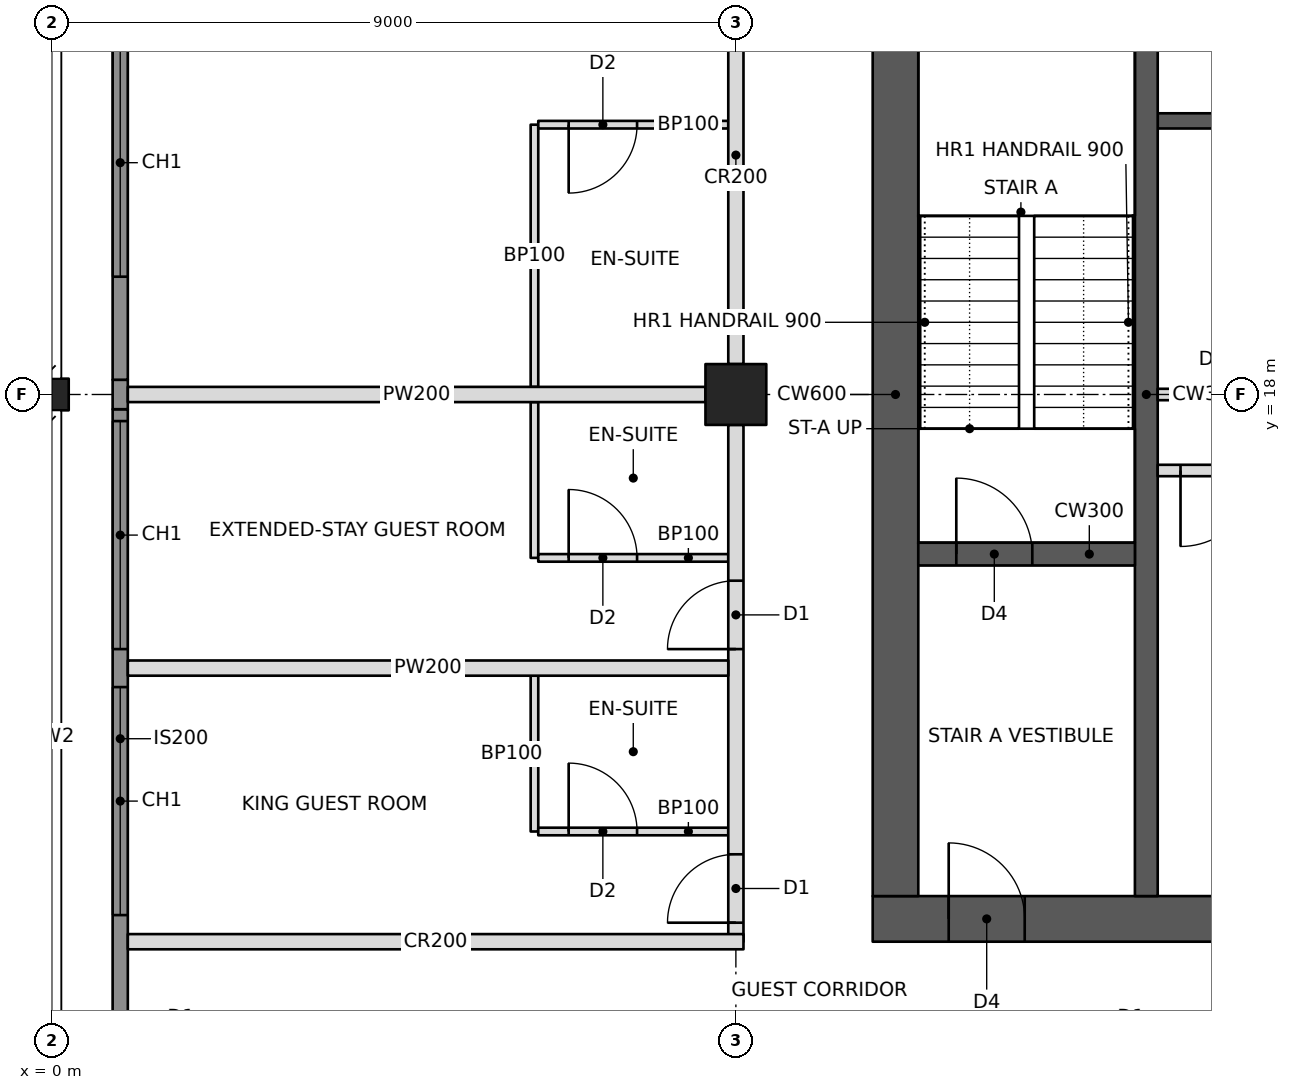
"""IFC4 building model, lengths in metres.
Left out: names, types, materials, properties, quantities, classifications, styles, units other than length and angle.
Written with IfcOpenShell. Run it as: python <this file> out.ifc"""

import sys

from ifc_helpers import new_model, si_unit, direction, frame, frame_2d, origin, origin_2d, place, context, subcontext, project, spatial, rectangle, hollow_rectangle, i_section, extrude, element, fill, save


model = new_model("IFC4")
c1 = context("Model", 3, precision=1e-05, world=origin(), true_north=direction((0.0, 1.0)))
c2 = subcontext(c1, "Body", "Model", "MODEL_VIEW")
j1 = project(units=[si_unit("LENGTHUNIT", "METRE"), si_unit("PLANEANGLEUNIT", "RADIAN")], contexts=[c1])
p1 = place(None, origin())
s1 = spatial("IfcSite", under=j1, at=p1, CompositionType="ELEMENT")
p2 = place(p1, origin())
s2 = spatial("IfcBuilding", under=s1, at=p2, CompositionType="ELEMENT")
p3 = place(p2, frame((0.0, 0.0, 255.4)))
s3 = spatial("IfcBuildingStorey", under=s2, at=p3, CompositionType="ELEMENT", Elevation=255.4)
p4 = place(p3, frame((0.0, 18.0, 0.0), z_axis=(0.0, 0.0, 1.0), x_axis=(0.0, 1.0, 0.0)))
e1 = element("IfcColumn", 1, at=p4, inside=s3, PredefinedType="COLUMN", context=c2, shape_type="SweptSolid", body=[
    extrude(i_section(OverallWidth=0.417, OverallDepth=0.445, WebThickness=0.039, FlangeThickness=0.063, at=origin_2d()), origin(), (0.0, 0.0, 1.0), 3.6),
])
p5 = place(p3, frame((9.0, 18.0, 0.0), z_axis=(0.0, 0.0, 1.0), x_axis=(1.0, 0.0, 0.0)))
e2 = element("IfcColumn", 2, at=p5, inside=s3, PredefinedType="COLUMN", context=c2, shape_type="SweptSolid", body=[
    extrude(hollow_rectangle(XDim=0.8, YDim=0.8, WallThickness=0.032, at=origin_2d()), origin(), (0.0, 0.0, 1.0), 3.6),
])
p6 = place(p3, frame((10.8, 11.1, 0.0), z_axis=(0.0, 0.0, 1.0), x_axis=(1.0, 0.0, 0.0)))
e3 = element("IfcWall", 3, at=p6, inside=s3, PredefinedType="SHEAR", context=c2, shape_type="SweptSolid", body=[
    extrude(rectangle(XDim=23.4, YDim=0.6, at=frame_2d((11.7, 0.0))), origin(), (0.0, 0.0, 1.0), 3.6),
])
p7 = place(p6, frame((1.0, 0.0, 0.0)))
e4 = element("IfcOpeningElement", 4, at=p7, cuts=e3, PredefinedType="OPENING", context=c2, shape_type="SweptSolid", body=[
    extrude(rectangle(XDim=1.0, YDim=2.1, at=frame_2d((0.5, 1.05))), frame((0.0, 0.31, 0.0), z_axis=(0.0, -1.0, 0.0), x_axis=(1.0, 0.0, 0.0)), (0.0, 0.0, 1.0), 0.62),
])
p8 = place(p6, frame((17.2, 0.0, 0.0)))
e5 = element("IfcOpeningElement", 5, at=p8, cuts=e3, PredefinedType="OPENING", context=c2, shape_type="SweptSolid", body=[
    extrude(rectangle(XDim=1.8, YDim=2.1, at=frame_2d((0.9, 1.05))), frame((0.0, 0.31, 0.0), z_axis=(0.0, -1.0, 0.0), x_axis=(1.0, 0.0, 0.0)), (0.0, 0.0, 1.0), 0.62),
])
p9 = place(p3, frame((11.1, 11.4, 0.0), z_axis=(0.0, 0.0, 1.0), x_axis=(0.0, 1.0, 0.0)))
e6 = element("IfcWall", 6, at=p9, inside=s3, PredefinedType="SHEAR", context=c2, shape_type="SweptSolid", body=[
    extrude(rectangle(XDim=13.2, YDim=0.6, at=frame_2d((6.6, 0.0))), origin(), (0.0, 0.0, 1.0), 3.6),
])
p10 = place(p3, frame((14.4, 11.4, 0.0), z_axis=(0.0, 0.0, 1.0), x_axis=(0.0, 1.0, 0.0)))
e7 = element("IfcWall", 7, at=p10, inside=s3, PredefinedType="SHEAR", context=c2, shape_type="SweptSolid", body=[
    extrude(rectangle(XDim=13.2, YDim=0.3, at=frame_2d((6.6, 0.0))), origin(), (0.0, 0.0, 1.0), 3.6),
])
p11 = place(p3, frame((11.4, 15.9, 0.0), z_axis=(0.0, 0.0, 1.0), x_axis=(1.0, 0.0, 0.0)))
e8 = element("IfcWall", 8, at=p11, inside=s3, PredefinedType="SHEAR", context=c2, shape_type="SweptSolid", body=[
    extrude(rectangle(XDim=2.85, YDim=0.3, at=frame_2d((1.425, 0.0))), origin(), (0.0, 0.0, 1.0), 3.6),
])
p12 = place(p11, frame((0.5, 0.0, 0.0)))
e9 = element("IfcOpeningElement", 9, at=p12, cuts=e8, PredefinedType="OPENING", context=c2, shape_type="SweptSolid", body=[
    extrude(rectangle(XDim=1.0, YDim=2.1, at=frame_2d((0.5, 1.05))), frame((0.0, 0.16, 0.0), z_axis=(0.0, -1.0, 0.0), x_axis=(1.0, 0.0, 0.0)), (0.0, 0.0, 1.0), 0.32),
])
p13 = place(p3, frame((14.55, 18.0, 0.0), z_axis=(0.0, 0.0, 1.0), x_axis=(1.0, 0.0, 0.0)))
e10 = element("IfcWall", 10, at=p13, inside=s3, PredefinedType="PARTITIONING", context=c2, shape_type="SweptSolid", body=[
    extrude(rectangle(XDim=3.3, YDim=0.15, at=frame_2d((1.65, 0.0))), origin(), (0.0, 0.0, 1.0), 3.4),
])
p14 = place(p3, frame((14.55, 21.6, 0.0), z_axis=(0.0, 0.0, 1.0), x_axis=(1.0, 0.0, 0.0)))
e11 = element("IfcWall", 11, at=p14, inside=s3, PredefinedType="SHEAR", context=c2, shape_type="SweptSolid", body=[
    extrude(rectangle(XDim=3.3, YDim=0.2, at=frame_2d((1.65, 0.0))), origin(), (0.0, 0.0, 1.0), 3.6),
])
p15 = place(p3, frame((9.0, 10.8, 0.0), z_axis=(0.0, 0.0, 1.0), x_axis=(0.0, 1.0, 0.0)))
e12 = element("IfcWall", 12, at=p15, inside=s3, PredefinedType="PARTITIONING", context=c2, shape_type="SweptSolid", body=[
    extrude(rectangle(XDim=6.8, YDim=0.2, at=frame_2d((3.4, 0.0))), origin(), (0.0, 0.0, 1.0), 2.605),
])
p16 = place(p15, frame((0.25, 0.0, 0.0)))
e13 = element("IfcOpeningElement", 13, at=p16, cuts=e12, PredefinedType="OPENING", context=c2, shape_type="SweptSolid", body=[
    extrude(rectangle(XDim=0.9, YDim=2.1, at=frame_2d((0.45, 1.05))), frame((0.0, 0.11, 0.0), z_axis=(0.0, -1.0, 0.0), x_axis=(1.0, 0.0, 0.0)), (0.0, 0.0, 1.0), 0.22),
])
p17 = place(p15, frame((3.85, 0.0, 0.0)))
e14 = element("IfcOpeningElement", 14, at=p17, cuts=e12, PredefinedType="OPENING", context=c2, shape_type="SweptSolid", body=[
    extrude(rectangle(XDim=0.9, YDim=2.1, at=frame_2d((0.45, 1.05))), frame((0.0, 0.11, 0.0), z_axis=(0.0, -1.0, 0.0), x_axis=(1.0, 0.0, 0.0)), (0.0, 0.0, 1.0), 0.22),
])
p18 = place(p3, frame((9.0, 18.4, 0.0), z_axis=(0.0, 0.0, 1.0), x_axis=(0.0, 1.0, 0.0)))
e15 = element("IfcWall", 15, at=p18, inside=s3, PredefinedType="PARTITIONING", context=c2, shape_type="SweptSolid", body=[
    extrude(rectangle(XDim=8.2, YDim=0.2, at=frame_2d((4.1, 0.0))), origin(), (0.0, 0.0, 1.0), 2.605),
])
p19 = place(p18, frame((5.65, 0.0, 0.0)))
e16 = element("IfcOpeningElement", 16, at=p19, cuts=e15, PredefinedType="OPENING", context=c2, shape_type="SweptSolid", body=[
    extrude(rectangle(XDim=0.9, YDim=2.1, at=frame_2d((0.45, 1.05))), frame((0.0, 0.11, 0.0), z_axis=(0.0, -1.0, 0.0), x_axis=(1.0, 0.0, 0.0)), (0.0, 0.0, 1.0), 0.22),
])
p20 = place(p3, frame((1.0, 10.8, 0.0), z_axis=(0.0, 0.0, 1.0), x_axis=(1.0, 0.0, 0.0)))
e17 = element("IfcWall", 17, at=p20, inside=s3, PredefinedType="PARTITIONING", context=c2, shape_type="SweptSolid", body=[
    extrude(rectangle(XDim=8.1, YDim=0.2, at=frame_2d((4.05, 0.0))), origin(), (0.0, 0.0, 1.0), 2.604),
])
p21 = place(p3, frame((8.9, 14.4, 0.0), z_axis=(0.0, 0.0, 1.0), x_axis=(-1.0, 0.0, 0.0)))
e18 = element("IfcWall", 18, at=p21, inside=s3, PredefinedType="PARTITIONING", context=c2, shape_type="SweptSolid", body=[
    extrude(rectangle(XDim=7.9, YDim=0.2, at=frame_2d((3.95, 0.0))), origin(), (0.0, 0.0, 1.0), 2.604),
])
p22 = place(p3, frame((8.6, 18.0, 0.0), z_axis=(0.0, 0.0, 1.0), x_axis=(-1.0, 0.0, 0.0)))
e19 = element("IfcWall", 19, at=p22, inside=s3, PredefinedType="PARTITIONING", context=c2, shape_type="SweptSolid", body=[
    extrude(rectangle(XDim=7.6, YDim=0.2, at=frame_2d((3.8, 0.0))), origin(), (0.0, 0.0, 1.0), 2.605),
])
p23 = place(p3, frame((6.35, 12.25, 0.0), z_axis=(0.0, 0.0, 1.0), x_axis=(0.0, 1.0, 0.0)))
e20 = element("IfcWall", 20, at=p23, inside=s3, PredefinedType="PARTITIONING", context=c2, shape_type="SweptSolid", body=[
    extrude(rectangle(XDim=2.05, YDim=0.1, at=frame_2d((1.025, 0.0))), origin(), (0.0, 0.0, 1.0), 3.4),
])
p24 = place(p3, frame((8.9, 12.25, 0.0), z_axis=(0.0, 0.0, 1.0), x_axis=(-1.0, 0.0, 0.0)))
e21 = element("IfcWall", 21, at=p24, inside=s3, PredefinedType="PARTITIONING", context=c2, shape_type="SweptSolid", body=[
    extrude(rectangle(XDim=2.5, YDim=0.1, at=frame_2d((1.25, 0.0))), origin(), (0.0, 0.0, 1.0), 2.604),
])
p25 = place(p24, frame((1.2, 0.0, 0.0)))
e22 = element("IfcOpeningElement", 22, at=p25, cuts=e21, PredefinedType="OPENING", context=c2, shape_type="SweptSolid", body=[
    extrude(rectangle(XDim=0.9, YDim=2.1, at=frame_2d((0.45, 1.05))), frame((0.0, 0.06, 0.0), z_axis=(0.0, -1.0, 0.0), x_axis=(1.0, 0.0, 0.0)), (0.0, 0.0, 1.0), 0.12),
])
p26 = place(p3, frame((6.35, 15.85, 0.0), z_axis=(0.0, 0.0, 1.0), x_axis=(0.0, 1.0, 0.0)))
e23 = element("IfcWall", 23, at=p26, inside=s3, PredefinedType="PARTITIONING", context=c2, shape_type="SweptSolid", body=[
    extrude(rectangle(XDim=2.05, YDim=0.1, at=frame_2d((1.025, 0.0))), origin(), (0.0, 0.0, 1.0), 2.604),
])
p27 = place(p3, frame((8.9, 15.85, 0.0), z_axis=(0.0, 0.0, 1.0), x_axis=(-1.0, 0.0, 0.0)))
e24 = element("IfcWall", 24, at=p27, inside=s3, PredefinedType="PARTITIONING", context=c2, shape_type="SweptSolid", body=[
    extrude(rectangle(XDim=2.5, YDim=0.1, at=frame_2d((1.25, 0.0))), origin(), (0.0, 0.0, 1.0), 2.604),
])
p28 = place(p27, frame((1.2, 0.0, 0.0)))
e25 = element("IfcOpeningElement", 25, at=p28, cuts=e24, PredefinedType="OPENING", context=c2, shape_type="SweptSolid", body=[
    extrude(rectangle(XDim=0.9, YDim=2.1, at=frame_2d((0.45, 1.05))), frame((0.0, 0.06, 0.0), z_axis=(0.0, -1.0, 0.0), x_axis=(1.0, 0.0, 0.0)), (0.0, 0.0, 1.0), 0.12),
])
p29 = place(p3, frame((6.35, 18.1, 0.0), z_axis=(0.0, 0.0, 1.0), x_axis=(0.0, 1.0, 0.0)))
e26 = element("IfcWall", 26, at=p29, inside=s3, PredefinedType="PARTITIONING", context=c2, shape_type="SweptSolid", body=[
    extrude(rectangle(XDim=3.45, YDim=0.1, at=frame_2d((1.725, 0.0))), origin(), (0.0, 0.0, 1.0), 2.604),
])
p30 = place(p3, frame((8.9, 21.55, 0.0), z_axis=(0.0, 0.0, 1.0), x_axis=(-1.0, 0.0, 0.0)))
e27 = element("IfcWall", 27, at=p30, inside=s3, PredefinedType="PARTITIONING", context=c2, shape_type="SweptSolid", body=[
    extrude(rectangle(XDim=2.5, YDim=0.1, at=frame_2d((1.25, 0.0))), origin(), (0.0, 0.0, 1.0), 2.604),
])
p31 = place(p30, frame((1.2, 0.0, 0.0)))
e28 = element("IfcOpeningElement", 28, at=p31, cuts=e27, PredefinedType="OPENING", context=c2, shape_type="SweptSolid", body=[
    extrude(rectangle(XDim=0.9, YDim=2.1, at=frame_2d((0.45, 1.05))), frame((0.0, 0.06, 0.0), z_axis=(0.0, -1.0, 0.0), x_axis=(1.0, 0.0, 0.0)), (0.0, 0.0, 1.0), 0.12),
])
p32 = place(p3, frame((14.55, 17.0, 0.0), z_axis=(0.0, 0.0, 1.0), x_axis=(1.0, 0.0, 0.0)))
e29 = element("IfcWall", 29, at=p32, inside=s3, PredefinedType="PARTITIONING", context=c2, shape_type="SweptSolid", body=[
    extrude(rectangle(XDim=3.3, YDim=0.15, at=frame_2d((1.65, 0.0))), origin(), (0.0, 0.0, 1.0), 3.4),
])
p33 = place(p32, frame((0.3, 0.0, 0.0)))
e30 = element("IfcOpeningElement", 30, at=p33, cuts=e29, PredefinedType="OPENING", context=c2, shape_type="SweptSolid", body=[
    extrude(rectangle(XDim=1.0, YDim=2.1, at=frame_2d((0.5, 1.05))), frame((0.0, 0.085, 0.0), z_axis=(0.0, -1.0, 0.0), x_axis=(1.0, 0.0, 0.0)), (0.0, 0.0, 1.0), 0.17),
])
p34 = place(p3, frame((0.9, 9.135, 0.0), z_axis=(0.0, 0.0, 1.0), x_axis=(0.0, 1.0, 0.0)))
e31 = element("IfcWall", 31, at=p34, inside=s3, PredefinedType="SOLIDWALL", context=c2, shape_type="SweptSolid", body=[
    extrude(rectangle(XDim=8.671, YDim=0.2, at=frame_2d((4.335, 0.0))), origin(), (0.0, 0.0, 1.0), 3.4),
])
p35 = place(p34, frame((2.015, 0.0, 0.6)))
e32 = element("IfcOpeningElement", 32, at=p35, cuts=e31, PredefinedType="OPENING", context=c2, shape_type="SweptSolid", body=[
    extrude(rectangle(XDim=3.0, YDim=2.2, at=frame_2d((1.5, 1.1))), frame((0.0, 0.11, 0.0), z_axis=(0.0, -1.0, 0.0), x_axis=(1.0, 0.0, 0.0)), (0.0, 0.0, 1.0), 0.22),
])
p36 = place(p34, frame((5.515, 0.0, 0.6)))
e33 = element("IfcOpeningElement", 33, at=p36, cuts=e31, PredefinedType="OPENING", context=c2, shape_type="SweptSolid", body=[
    extrude(rectangle(XDim=3.0, YDim=2.2, at=frame_2d((1.5, 1.1))), frame((0.0, 0.11, 0.0), z_axis=(0.0, -1.0, 0.0), x_axis=(1.0, 0.0, 0.0)), (0.0, 0.0, 1.0), 0.22),
])
p37 = place(p3, frame((0.9, 17.806, 0.0), z_axis=(0.0, 0.0, 1.0), x_axis=(0.0, 1.0, 0.0)))
e34 = element("IfcWall", 34, at=p37, inside=s3, PredefinedType="SOLIDWALL", context=c2, shape_type="SweptSolid", body=[
    extrude(rectangle(XDim=0.388, YDim=0.2, at=frame_2d((0.194, 0.0))), origin(), (0.0, 0.0, 1.0), 2.604),
])
p38 = place(p3, frame((0.9, 18.194, 0.0), z_axis=(0.0, 0.0, 1.0), x_axis=(0.0, 1.0, 0.0)))
e35 = element("IfcWall", 35, at=p38, inside=s3, PredefinedType="SOLIDWALL", context=c2, shape_type="SweptSolid", body=[
    extrude(rectangle(XDim=5.806, YDim=0.2, at=frame_2d((2.903, 0.0))), origin(), (0.0, 0.0, 1.0), 3.4),
])
p39 = place(p38, frame((1.356, 0.0, 0.6)))
e36 = element("IfcOpeningElement", 36, at=p39, cuts=e35, PredefinedType="OPENING", context=c2, shape_type="SweptSolid", body=[
    extrude(rectangle(XDim=3.0, YDim=2.2, at=frame_2d((1.5, 1.1))), frame((0.0, 0.11, 0.0), z_axis=(0.0, -1.0, 0.0), x_axis=(1.0, 0.0, 0.0)), (0.0, 0.0, 1.0), 0.22),
])
p40 = place(p35, origin())
e37 = element("IfcWindow", 37, at=p40, inside=s3, PartitioningType="TRIPLE_PANEL_VERTICAL", PredefinedType="WINDOW", context=c2, shape_type="SweptSolid", body=[
    extrude(rectangle(XDim=3.0, YDim=2.2, at=frame_2d((1.5, 1.1))), frame((0.0, 0.03, 0.0), z_axis=(0.0, -1.0, 0.0), x_axis=(1.0, 0.0, 0.0)), (0.0, 0.0, 1.0), 0.06),
])
fill(e32, e37)
p41 = place(p36, origin())
e38 = element("IfcWindow", 38, at=p41, inside=s3, PartitioningType="TRIPLE_PANEL_VERTICAL", PredefinedType="WINDOW", context=c2, shape_type="SweptSolid", body=[
    extrude(rectangle(XDim=3.0, YDim=2.2, at=frame_2d((1.5, 1.1))), frame((0.0, 0.03, 0.0), z_axis=(0.0, -1.0, 0.0), x_axis=(1.0, 0.0, 0.0)), (0.0, 0.0, 1.0), 0.06),
])
fill(e33, e38)
p42 = place(p39, origin())
e39 = element("IfcWindow", 39, at=p42, inside=s3, PartitioningType="TRIPLE_PANEL_VERTICAL", PredefinedType="WINDOW", context=c2, shape_type="SweptSolid", body=[
    extrude(rectangle(XDim=3.0, YDim=2.2, at=frame_2d((1.5, 1.1))), frame((0.0, 0.03, 0.0), z_axis=(0.0, -1.0, 0.0), x_axis=(1.0, 0.0, 0.0)), (0.0, 0.0, 1.0), 0.06),
])
fill(e36, e39)
p43 = place(p25, frame((0.9, 0.0, 0.0), z_axis=(0.0, 0.0, 1.0), x_axis=(-1.0, 0.0, 0.0)))
e40 = element("IfcDoor", 40, at=p43, inside=s3, OperationType="SINGLE_SWING_LEFT", PredefinedType="DOOR", context=c2, shape_type="SweptSolid", body=[
    extrude(rectangle(XDim=0.9, YDim=2.1, at=frame_2d((0.45, 1.05))), frame((0.0, 0.025, 0.0), z_axis=(0.0, -1.0, 0.0), x_axis=(1.0, 0.0, 0.0)), (0.0, 0.0, 1.0), 0.05),
])
fill(e22, e40)
p44 = place(p16, origin())
e41 = element("IfcDoor", 41, at=p44, inside=s3, OperationType="SINGLE_SWING_LEFT", PredefinedType="DOOR", context=c2, shape_type="SweptSolid", body=[
    extrude(rectangle(XDim=0.9, YDim=2.1, at=frame_2d((0.45, 1.05))), frame((0.0, 0.025, 0.0), z_axis=(0.0, -1.0, 0.0), x_axis=(1.0, 0.0, 0.0)), (0.0, 0.0, 1.0), 0.05),
])
fill(e13, e41)
p45 = place(p28, frame((0.9, 0.0, 0.0), z_axis=(0.0, 0.0, 1.0), x_axis=(-1.0, 0.0, 0.0)))
e42 = element("IfcDoor", 42, at=p45, inside=s3, OperationType="SINGLE_SWING_LEFT", PredefinedType="DOOR", context=c2, shape_type="SweptSolid", body=[
    extrude(rectangle(XDim=0.9, YDim=2.1, at=frame_2d((0.45, 1.05))), frame((0.0, 0.025, 0.0), z_axis=(0.0, -1.0, 0.0), x_axis=(1.0, 0.0, 0.0)), (0.0, 0.0, 1.0), 0.05),
])
fill(e25, e42)
p46 = place(p17, origin())
e43 = element("IfcDoor", 43, at=p46, inside=s3, OperationType="SINGLE_SWING_LEFT", PredefinedType="DOOR", context=c2, shape_type="SweptSolid", body=[
    extrude(rectangle(XDim=0.9, YDim=2.1, at=frame_2d((0.45, 1.05))), frame((0.0, 0.025, 0.0), z_axis=(0.0, -1.0, 0.0), x_axis=(1.0, 0.0, 0.0)), (0.0, 0.0, 1.0), 0.05),
])
fill(e14, e43)
p47 = place(p31, origin())
e44 = element("IfcDoor", 44, at=p47, inside=s3, OperationType="SINGLE_SWING_RIGHT", PredefinedType="DOOR", context=c2, shape_type="SweptSolid", body=[
    extrude(rectangle(XDim=0.9, YDim=2.1, at=frame_2d((0.45, 1.05))), frame((0.0, 0.025, 0.0), z_axis=(0.0, -1.0, 0.0), x_axis=(1.0, 0.0, 0.0)), (0.0, 0.0, 1.0), 0.05),
])
fill(e28, e44)
p48 = place(p33, frame((1.0, 0.0, 0.0), z_axis=(0.0, 0.0, 1.0), x_axis=(-1.0, 0.0, 0.0)))
e45 = element("IfcDoor", 45, at=p48, inside=s3, OperationType="SINGLE_SWING_RIGHT", PredefinedType="DOOR", context=c2, shape_type="SweptSolid", body=[
    extrude(rectangle(XDim=1.0, YDim=2.1, at=frame_2d((0.5, 1.05))), frame((0.0, 0.025, 0.0), z_axis=(0.0, -1.0, 0.0), x_axis=(1.0, 0.0, 0.0)), (0.0, 0.0, 1.0), 0.05),
])
fill(e30, e45)
p49 = place(p7, origin())
e46 = element("IfcDoor", 46, at=p49, inside=s3, OperationType="SINGLE_SWING_LEFT", PredefinedType="DOOR", context=c2, shape_type="SweptSolid", body=[
    extrude(rectangle(XDim=1.0, YDim=2.1, at=frame_2d((0.5, 1.05))), frame((0.0, 0.025, 0.0), z_axis=(0.0, -1.0, 0.0), x_axis=(1.0, 0.0, 0.0)), (0.0, 0.0, 1.0), 0.05),
])
fill(e4, e46)
p50 = place(p12, origin())
e47 = element("IfcDoor", 47, at=p50, inside=s3, OperationType="SINGLE_SWING_LEFT", PredefinedType="DOOR", context=c2, shape_type="SweptSolid", body=[
    extrude(rectangle(XDim=1.0, YDim=2.1, at=frame_2d((0.5, 1.05))), frame((0.0, 0.025, 0.0), z_axis=(0.0, -1.0, 0.0), x_axis=(1.0, 0.0, 0.0)), (0.0, 0.0, 1.0), 0.05),
])
fill(e9, e47)
save(model, sys.argv[1])
